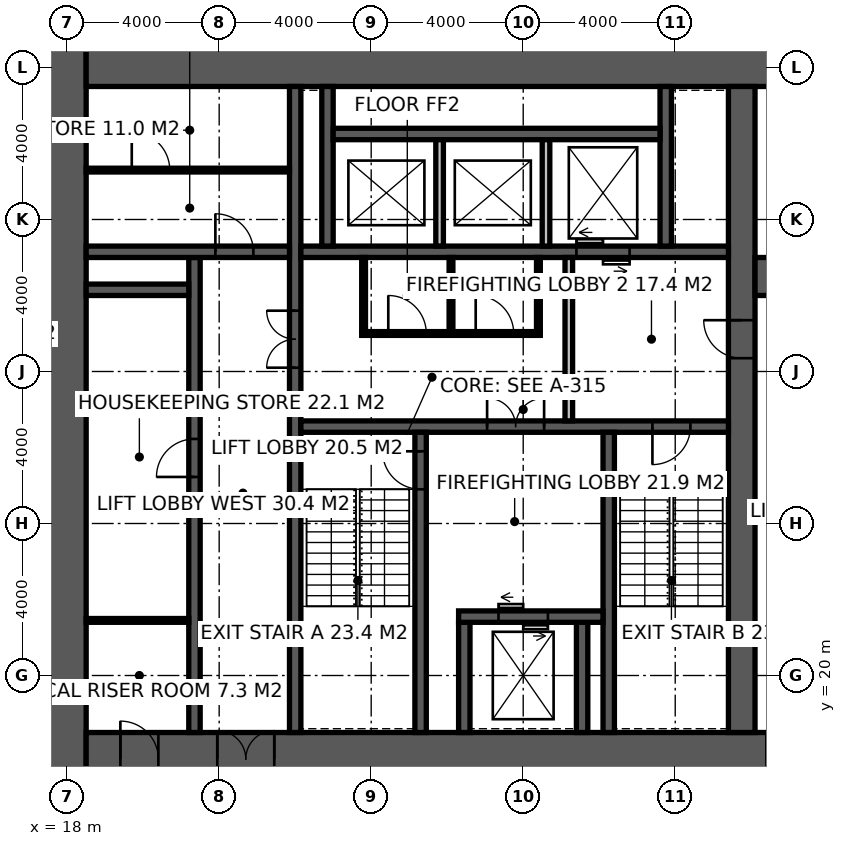
"""IFC4 building model, lengths in metres.
Left out: names, types, materials, properties, quantities, classifications, styles, units other than length and angle.
Written with IfcOpenShell. Run it as: python <this file> out.ifc"""

import sys

from ifc_helpers import new_model, si_unit, direction, frame, frame_2d, origin, place, context, subcontext, project, spatial, rectangle, extrude, element, fill, save


model = new_model("IFC4")
c1 = context("Model", 3, precision=1e-05, world=origin(), true_north=direction((0.0, 1.0)))
c2 = subcontext(c1, "Body", "Model", "MODEL_VIEW")
j1 = project(units=[si_unit("LENGTHUNIT", "METRE"), si_unit("PLANEANGLEUNIT", "RADIAN")], contexts=[c1])
p1 = place(None, origin())
s1 = spatial("IfcSite", under=j1, at=p1, CompositionType="ELEMENT")
p2 = place(p1, origin())
s2 = spatial("IfcBuilding", under=s1, at=p2, CompositionType="ELEMENT")
p3 = place(p2, frame((0.0, 0.0, 47.0)))
s3 = spatial("IfcBuildingStorey", under=s2, at=p3, CompositionType="ELEMENT", Elevation=47.0)
p4 = place(p3, frame((18.0, 17.1, -0.15), z_axis=(0.0, 0.0, 1.0), x_axis=(0.0, 1.0, 0.0)))
e1 = element("IfcWall", 1, at=p4, inside=s3, PredefinedType="SHEAR", context=c2, shape_type="SweptSolid", body=[
    extrude(rectangle(XDim=19.8, YDim=1.0, at=frame_2d((9.9, 0.0))), origin(), (0.0, 0.0, 1.0), 4.0),
])
p5 = place(p3, frame((18.5, 17.8, -0.15), z_axis=(0.0, 0.0, 1.0), x_axis=(1.0, 0.0, 0.0)))
e2 = element("IfcWall", 2, at=p5, inside=s3, PredefinedType="SHEAR", context=c2, shape_type="SweptSolid", body=[
    extrude(rectangle(XDim=23.4, YDim=1.4, at=frame_2d((11.7, 0.0))), origin(), (0.0, 0.0, 1.0), 4.0),
])
p6 = place(p5, frame((3.45, 0.0, 0.15)))
e3 = element("IfcOpeningElement", 3, at=p6, cuts=e2, PredefinedType="OPENING", context=c2, shape_type="SweptSolid", body=[
    extrude(rectangle(XDim=1.5, YDim=2.4, at=frame_2d((0.75, 1.2))), frame((0.0, 0.71, 0.0), z_axis=(0.0, -1.0, 0.0), x_axis=(1.0, 0.0, 0.0)), (0.0, 0.0, 1.0), 1.42),
])
p7 = place(p5, frame((17.9, 0.0, 0.15)))
e4 = element("IfcOpeningElement", 4, at=p7, cuts=e2, PredefinedType="OPENING", context=c2, shape_type="SweptSolid", body=[
    extrude(rectangle(XDim=1.5, YDim=2.4, at=frame_2d((0.75, 1.2))), frame((0.0, 0.71, 0.0), z_axis=(0.0, -1.0, 0.0), x_axis=(1.0, 0.0, 0.0)), (0.0, 0.0, 1.0), 1.42),
])
p8 = place(p5, frame((0.9, 0.0, 0.15)))
e5 = element("IfcOpeningElement", 5, at=p8, cuts=e2, PredefinedType="OPENING", context=c2, shape_type="SweptSolid", body=[
    extrude(rectangle(XDim=1.0, YDim=2.2, at=frame_2d((0.5, 1.1))), frame((0.0, 0.71, 0.0), z_axis=(0.0, -1.0, 0.0), x_axis=(1.0, 0.0, 0.0)), (0.0, 0.0, 1.0), 1.42),
])
p9 = place(p3, frame((18.5, 36.2, -0.15), z_axis=(0.0, 0.0, 1.0), x_axis=(1.0, 0.0, 0.0)))
e6 = element("IfcWall", 6, at=p9, inside=s3, PredefinedType="SHEAR", context=c2, shape_type="SweptSolid", body=[
    extrude(rectangle(XDim=23.4, YDim=1.4, at=frame_2d((11.7, 0.0))), origin(), (0.0, 0.0, 1.0), 4.0),
])
p10 = place(p3, frame((35.75, 18.5, -0.15), z_axis=(0.0, 0.0, 1.0), x_axis=(0.0, 1.0, 0.0)))
e7 = element("IfcWall", 7, at=p10, inside=s3, PredefinedType="SHEAR", context=c2, shape_type="SweptSolid", body=[
    extrude(rectangle(XDim=17.0, YDim=0.7, at=frame_2d((8.5, 0.0))), origin(), (0.0, 0.0, 1.0), 4.0),
])
p11 = place(p10, frame((9.85, 0.0, 0.15)))
e8 = element("IfcOpeningElement", 8, at=p11, cuts=e7, PredefinedType="OPENING", context=c2, shape_type="SweptSolid", body=[
    extrude(rectangle(XDim=1.0, YDim=2.2, at=frame_2d((0.5, 1.1))), frame((0.0, 0.36, 0.0), z_axis=(0.0, -1.0, 0.0), x_axis=(1.0, 0.0, 0.0)), (0.0, 0.0, 1.0), 0.72),
])
p12 = place(p3, frame((24.0, 18.5, -0.15), z_axis=(0.0, 0.0, 1.0), x_axis=(0.0, 1.0, 0.0)))
e9 = element("IfcWall", 9, at=p12, inside=s3, PredefinedType="SHEAR", context=c2, shape_type="SweptSolid", body=[
    extrude(rectangle(XDim=17.0, YDim=0.3, at=frame_2d((8.5, 0.0))), origin(), (0.0, 0.0, 1.0), 4.0),
])
p13 = place(p12, frame((9.6, 0.0, 0.15)))
e10 = element("IfcOpeningElement", 10, at=p13, cuts=e9, PredefinedType="OPENING", context=c2, shape_type="SweptSolid", body=[
    extrude(rectangle(XDim=1.5, YDim=2.4, at=frame_2d((0.75, 1.2))), frame((0.0, 0.16, 0.0), z_axis=(0.0, -1.0, 0.0), x_axis=(1.0, 0.0, 0.0)), (0.0, 0.0, 1.0), 0.32),
])
p14 = place(p3, frame((24.15, 26.55, -0.15), z_axis=(0.0, 0.0, 1.0), x_axis=(1.0, 0.0, 0.0)))
e11 = element("IfcWall", 11, at=p14, inside=s3, PredefinedType="SHEAR", context=c2, shape_type="SweptSolid", body=[
    extrude(rectangle(XDim=11.25, YDim=0.3, at=frame_2d((5.625, 0.0))), origin(), (0.0, 0.0, 1.0), 4.0),
])
p15 = place(p14, frame((9.25, 0.0, 0.15)))
e12 = element("IfcOpeningElement", 12, at=p15, cuts=e11, PredefinedType="OPENING", context=c2, shape_type="SweptSolid", body=[
    extrude(rectangle(XDim=1.0, YDim=2.2, at=frame_2d((0.5, 1.1))), frame((0.0, 0.16, 0.0), z_axis=(0.0, -1.0, 0.0), x_axis=(1.0, 0.0, 0.0)), (0.0, 0.0, 1.0), 0.32),
])
p16 = place(p14, frame((4.9, 0.0, 0.15)))
e13 = element("IfcOpeningElement", 13, at=p16, cuts=e11, PredefinedType="OPENING", context=c2, shape_type="SweptSolid", body=[
    extrude(rectangle(XDim=1.5, YDim=2.4, at=frame_2d((0.75, 1.2))), frame((0.0, 0.16, 0.0), z_axis=(0.0, -1.0, 0.0), x_axis=(1.0, 0.0, 0.0)), (0.0, 0.0, 1.0), 0.32),
])
p17 = place(p3, frame((27.3, 18.5, -0.15), z_axis=(0.0, 0.0, 1.0), x_axis=(0.0, 1.0, 0.0)))
e14 = element("IfcWall", 14, at=p17, inside=s3, PredefinedType="SHEAR", context=c2, shape_type="SweptSolid", body=[
    extrude(rectangle(XDim=7.9, YDim=0.3, at=frame_2d((3.95, 0.0))), origin(), (0.0, 0.0, 1.0), 4.0),
])
p18 = place(p17, frame((6.4, 0.0, 0.15)))
e15 = element("IfcOpeningElement", 15, at=p18, cuts=e14, PredefinedType="OPENING", context=c2, shape_type="SweptSolid", body=[
    extrude(rectangle(XDim=1.0, YDim=2.2, at=frame_2d((0.5, 1.1))), frame((0.0, 0.16, 0.0), z_axis=(0.0, -1.0, 0.0), x_axis=(1.0, 0.0, 0.0)), (0.0, 0.0, 1.0), 0.32),
])
p19 = place(p3, frame((32.25, 18.5, -0.15), z_axis=(0.0, 0.0, 1.0), x_axis=(0.0, 1.0, 0.0)))
e16 = element("IfcWall", 16, at=p19, inside=s3, PredefinedType="SHEAR", context=c2, shape_type="SweptSolid", body=[
    extrude(rectangle(XDim=7.9, YDim=0.3, at=frame_2d((3.95, 0.0))), origin(), (0.0, 0.0, 1.0), 4.0),
])
for number, where, z_axis, x_axis in (
    (17, (28.45, 18.5, -0.15), (0.0, 0.0, 1.0), (0.0, 1.0, 0.0)),
    (18, (31.55, 18.5, -0.15), (0.0, 0.0, 1.0), (0.0, 1.0, 0.0)),
):
    element("IfcWall", number, at=place(p3, frame(where, z_axis=z_axis, x_axis=x_axis)), inside=s3, PredefinedType="SHEAR", context=c2, shape_type="SweptSolid", body=[
        extrude(rectangle(XDim=2.9, YDim=0.3, at=frame_2d((1.45, 0.0))), origin(), (0.0, 0.0, 1.0), 4.0),
    ])
p20 = place(p3, frame((28.3, 21.55, -0.15), z_axis=(0.0, 0.0, 1.0), x_axis=(1.0, 0.0, 0.0)))
e19 = element("IfcWall", 19, at=p20, inside=s3, PredefinedType="SHEAR", context=c2, shape_type="SweptSolid", body=[
    extrude(rectangle(XDim=3.8, YDim=0.3, at=frame_2d((1.9, 0.0))), origin(), (0.0, 0.0, 1.0), 4.0),
])
p21 = place(p20, frame((1.05, 0.0, 0.15)))
e20 = element("IfcOpeningElement", 20, at=p21, cuts=e19, PredefinedType="OPENING", context=c2, shape_type="SweptSolid", body=[
    extrude(rectangle(XDim=1.3, YDim=2.4, at=frame_2d((0.65, 1.2))), frame((0.0, 0.16, 0.0), z_axis=(0.0, -1.0, 0.0), x_axis=(1.0, 0.0, 0.0)), (0.0, 0.0, 1.0), 0.32),
])
p22 = place(p3, frame((24.15, 31.15, -0.15), z_axis=(0.0, 0.0, 1.0), x_axis=(1.0, 0.0, 0.0)))
e21 = element("IfcWall", 21, at=p22, inside=s3, PredefinedType="SHEAR", context=c2, shape_type="SweptSolid", body=[
    extrude(rectangle(XDim=11.25, YDim=0.3, at=frame_2d((5.625, 0.0))), origin(), (0.0, 0.0, 1.0), 4.0),
])
p23 = place(p22, frame((7.25, 0.0, 0.15)))
e22 = element("IfcOpeningElement", 22, at=p23, cuts=e21, PredefinedType="OPENING", context=c2, shape_type="SweptSolid", body=[
    extrude(rectangle(XDim=1.4, YDim=2.4, at=frame_2d((0.7, 1.2))), frame((0.0, 0.16, 0.0), z_axis=(0.0, -1.0, 0.0), x_axis=(1.0, 0.0, 0.0)), (0.0, 0.0, 1.0), 0.32),
])
p24 = place(p3, frame((21.35, 18.5, -0.15), z_axis=(0.0, 0.0, 1.0), x_axis=(0.0, 1.0, 0.0)))
e23 = element("IfcWall", 23, at=p24, inside=s3, PredefinedType="SHEAR", context=c2, shape_type="SweptSolid", body=[
    extrude(rectangle(XDim=12.5, YDim=0.3, at=frame_2d((6.25, 0.0))), origin(), (0.0, 0.0, 1.0), 4.0),
])
p25 = place(p24, frame((6.725, 0.0, 0.15)))
e24 = element("IfcOpeningElement", 24, at=p25, cuts=e23, PredefinedType="OPENING", context=c2, shape_type="SweptSolid", body=[
    extrude(rectangle(XDim=1.0, YDim=2.2, at=frame_2d((0.5, 1.1))), frame((0.0, 0.16, 0.0), z_axis=(0.0, -1.0, 0.0), x_axis=(1.0, 0.0, 0.0)), (0.0, 0.0, 1.0), 0.32),
])
p26 = place(p3, frame((18.5, 31.15, -0.15), z_axis=(0.0, 0.0, 1.0), x_axis=(1.0, 0.0, 0.0)))
e25 = element("IfcWall", 25, at=p26, inside=s3, PredefinedType="SHEAR", context=c2, shape_type="SweptSolid", body=[
    extrude(rectangle(XDim=5.35, YDim=0.3, at=frame_2d((2.675, 0.0))), origin(), (0.0, 0.0, 1.0), 4.0),
])
p27 = place(p26, frame((3.4, 0.0, 0.15)))
e26 = element("IfcOpeningElement", 26, at=p27, cuts=e25, PredefinedType="OPENING", context=c2, shape_type="SweptSolid", body=[
    extrude(rectangle(XDim=1.0, YDim=2.2, at=frame_2d((0.5, 1.1))), frame((0.0, 0.16, 0.0), z_axis=(0.0, -1.0, 0.0), x_axis=(1.0, 0.0, 0.0)), (0.0, 0.0, 1.0), 0.32),
])
p28 = place(p3, frame((18.5, 30.15, -0.15), z_axis=(0.0, 0.0, 1.0), x_axis=(1.0, 0.0, 0.0)))
e27 = element("IfcWall", 27, at=p28, inside=s3, PredefinedType="SHEAR", context=c2, shape_type="SweptSolid", body=[
    extrude(rectangle(XDim=2.7, YDim=0.3, at=frame_2d((1.35, 0.0))), origin(), (0.0, 0.0, 1.0), 4.0),
])
for number, where, z_axis, x_axis in (
    (28, (24.85, 31.3, -0.15), (0.0, 0.0, 1.0), (0.0, 1.0, 0.0)),
    (29, (33.75, 31.3, -0.15), (0.0, 0.0, 1.0), (0.0, 1.0, 0.0)),
):
    element("IfcWall", number, at=place(p3, frame(where, z_axis=z_axis, x_axis=x_axis)), inside=s3, PredefinedType="SHEAR", context=c2, shape_type="SweptSolid", body=[
        extrude(rectangle(XDim=4.2, YDim=0.3, at=frame_2d((2.1, 0.0))), origin(), (0.0, 0.0, 1.0), 4.0),
    ])
p29 = place(p3, frame((25.0, 34.25, -0.15), z_axis=(0.0, 0.0, 1.0), x_axis=(1.0, 0.0, 0.0)))
e30 = element("IfcWall", 30, at=p29, inside=s3, PredefinedType="SHEAR", context=c2, shape_type="SweptSolid", body=[
    extrude(rectangle(XDim=8.6, YDim=0.3, at=frame_2d((4.3, 0.0))), origin(), (0.0, 0.0, 1.0), 4.0),
])
for number, where, z_axis, x_axis in (
    (31, (27.8, 31.3, -0.15), (0.0, 0.0, 1.0), (0.0, 1.0, 0.0)),
    (32, (30.6, 31.3, -0.15), (0.0, 0.0, 1.0), (0.0, 1.0, 0.0)),
):
    element("IfcWall", number, at=place(p3, frame(where, z_axis=z_axis, x_axis=x_axis)), inside=s3, PredefinedType="SOLIDWALL", context=c2, shape_type="SweptSolid", body=[
        extrude(rectangle(XDim=2.8, YDim=0.2, at=frame_2d((1.4, 0.0))), origin(), (0.0, 0.0, 1.0), 4.0),
    ])
p30 = place(p3, frame((36.1, 30.5, -0.15), z_axis=(0.0, 0.0, 1.0), x_axis=(1.0, 0.0, 0.0)))
e33 = element("IfcWall", 33, at=p30, inside=s3, PredefinedType="SHEAR", context=c2, shape_type="SweptSolid", body=[
    extrude(rectangle(XDim=5.8, YDim=1.0, at=frame_2d((2.9, 0.0))), origin(), (0.0, 0.0, 1.0), 4.0),
])
p31 = place(p30, frame((0.6, 0.0, 0.15)))
e34 = element("IfcOpeningElement", 34, at=p31, cuts=e33, PredefinedType="OPENING", context=c2, shape_type="SweptSolid", body=[
    extrude(rectangle(XDim=1.0, YDim=2.2, at=frame_2d((0.5, 1.1))), frame((0.0, 0.51, 0.0), z_axis=(0.0, -1.0, 0.0), x_axis=(1.0, 0.0, 0.0)), (0.0, 0.0, 1.0), 1.02),
])
p32 = place(p3, frame((31.2, 26.7, 0.0), z_axis=(0.0, 0.0, 1.0), x_axis=(0.0, 1.0, 0.0)))
e35 = element("IfcWall", 35, at=p32, inside=s3, PredefinedType="SOLIDWALL", context=c2, shape_type="SweptSolid", body=[
    extrude(rectangle(XDim=4.3, YDim=0.2, at=frame_2d((2.15, 0.0))), origin(), (0.0, 0.0, 1.0), 3.85),
])
p33 = place(p3, frame((18.5, 33.3, 0.0), z_axis=(0.0, 0.0, 1.0), x_axis=(1.0, 0.0, 0.0)))
e36 = element("IfcWall", 36, at=p33, inside=s3, PredefinedType="PARTITIONING", context=c2, shape_type="SweptSolid", body=[
    extrude(rectangle(XDim=5.35, YDim=0.1, at=frame_2d((2.675, 0.0))), origin(), (0.0, 0.0, 1.0), 3.85),
])
p34 = place(p33, frame((1.2, 0.0, 0.0)))
e37 = element("IfcOpeningElement", 37, at=p34, cuts=e36, PredefinedType="OPENING", context=c2, shape_type="SweptSolid", body=[
    extrude(rectangle(XDim=1.0, YDim=2.2, at=frame_2d((0.5, 1.1))), frame((0.0, 0.06, 0.0), z_axis=(0.0, -1.0, 0.0), x_axis=(1.0, 0.0, 0.0)), (0.0, 0.0, 1.0), 0.12),
])
p35 = place(p3, frame((25.75, 29.0, 0.0), z_axis=(0.0, 0.0, 1.0), x_axis=(1.0, 0.0, 0.0)))
e38 = element("IfcWall", 38, at=p35, inside=s3, PredefinedType="PARTITIONING", context=c2, shape_type="SweptSolid", body=[
    extrude(rectangle(XDim=4.7, YDim=0.1, at=frame_2d((2.35, 0.0))), origin(), (0.0, 0.0, 1.0), 3.85),
])
p36 = place(p35, frame((0.7, 0.0, 0.0)))
e39 = element("IfcOpeningElement", 39, at=p36, cuts=e38, PredefinedType="OPENING", context=c2, shape_type="SweptSolid", body=[
    extrude(rectangle(XDim=1.0, YDim=2.2, at=frame_2d((0.5, 1.1))), frame((0.0, 0.06, 0.0), z_axis=(0.0, -1.0, 0.0), x_axis=(1.0, 0.0, 0.0)), (0.0, 0.0, 1.0), 0.12),
])
p37 = place(p35, frame((3.0, 0.0, 0.0)))
e40 = element("IfcOpeningElement", 40, at=p37, cuts=e38, PredefinedType="OPENING", context=c2, shape_type="SweptSolid", body=[
    extrude(rectangle(XDim=1.0, YDim=2.2, at=frame_2d((0.5, 1.1))), frame((0.0, 0.06, 0.0), z_axis=(0.0, -1.0, 0.0), x_axis=(1.0, 0.0, 0.0)), (0.0, 0.0, 1.0), 0.12),
])
for number, where, z_axis, x_axis in (
    (41, (25.8, 29.05, 0.0), (0.0, 0.0, 1.0), (0.0, 1.0, 0.0)),
    (42, (30.4, 29.05, 0.0), (0.0, 0.0, 1.0), (0.0, 1.0, 0.0)),
    (43, (28.1, 29.05, 0.0), (0.0, 0.0, 1.0), (0.0, 1.0, 0.0)),
):
    element("IfcWall", number, at=place(p3, frame(where, z_axis=z_axis, x_axis=x_axis)), inside=s3, PredefinedType="PARTITIONING", context=c2, shape_type="SweptSolid", body=[
        extrude(rectangle(XDim=1.95, YDim=0.1, at=frame_2d((0.975, 0.0))), origin(), (0.0, 0.0, 1.0), 3.85),
    ])
p38 = place(p3, frame((18.5, 21.45, 0.0), z_axis=(0.0, 0.0, 1.0), x_axis=(1.0, 0.0, 0.0)))
e44 = element("IfcWall", 44, at=p38, inside=s3, PredefinedType="PARTITIONING", context=c2, shape_type="SweptSolid", body=[
    extrude(rectangle(XDim=2.7, YDim=0.1, at=frame_2d((1.35, 0.0))), origin(), (0.0, 0.0, 1.0), 3.85),
])
p39 = place(p18, origin())
e45 = element("IfcDoor", 45, at=p39, inside=s3, OperationType="SINGLE_SWING_RIGHT", PredefinedType="DOOR", context=c2, shape_type="SweptSolid", body=[
    extrude(rectangle(XDim=1.0, YDim=2.2, at=frame_2d((0.5, 1.1))), frame((0.0, 0.025, 0.0), z_axis=(0.0, -1.0, 0.0), x_axis=(1.0, 0.0, 0.0)), (0.0, 0.0, 1.0), 0.05),
])
fill(e15, e45)
p40 = place(p15, frame((1.0, 0.0, 0.0), z_axis=(0.0, 0.0, 1.0), x_axis=(-1.0, 0.0, 0.0)))
e46 = element("IfcDoor", 46, at=p40, inside=s3, OperationType="SINGLE_SWING_RIGHT", PredefinedType="DOOR", context=c2, shape_type="SweptSolid", body=[
    extrude(rectangle(XDim=1.0, YDim=2.2, at=frame_2d((0.5, 1.1))), frame((0.0, 0.025, 0.0), z_axis=(0.0, -1.0, 0.0), x_axis=(1.0, 0.0, 0.0)), (0.0, 0.0, 1.0), 0.05),
])
fill(e12, e46)
p41 = place(p11, origin())
e47 = element("IfcDoor", 47, at=p41, inside=s3, OperationType="SINGLE_SWING_RIGHT", PredefinedType="DOOR", context=c2, shape_type="SweptSolid", body=[
    extrude(rectangle(XDim=1.0, YDim=2.2, at=frame_2d((0.5, 1.1))), frame((0.0, 0.025, 0.0), z_axis=(0.0, -1.0, 0.0), x_axis=(1.0, 0.0, 0.0)), (0.0, 0.0, 1.0), 0.05),
])
fill(e8, e47)
p42 = place(p16, origin())
e48 = element("IfcDoor", 48, at=p42, inside=s3, OperationType="DOUBLE_DOOR_DOUBLE_SWING", PredefinedType="DOOR", context=c2, shape_type="SweptSolid", body=[
    extrude(rectangle(XDim=1.5, YDim=2.4, at=frame_2d((0.75, 1.2))), frame((0.0, 0.025, 0.0), z_axis=(0.0, -1.0, 0.0), x_axis=(1.0, 0.0, 0.0)), (0.0, 0.0, 1.0), 0.05),
])
fill(e13, e48)
p43 = place(p13, origin())
e49 = element("IfcDoor", 49, at=p43, inside=s3, OperationType="DOUBLE_DOOR_DOUBLE_SWING", PredefinedType="DOOR", context=c2, shape_type="SweptSolid", body=[
    extrude(rectangle(XDim=1.5, YDim=2.4, at=frame_2d((0.75, 1.2))), frame((0.0, 0.025, 0.0), z_axis=(0.0, -1.0, 0.0), x_axis=(1.0, 0.0, 0.0)), (0.0, 0.0, 1.0), 0.05),
])
fill(e10, e49)
p44 = place(p27, origin())
e50 = element("IfcDoor", 50, at=p44, inside=s3, OperationType="SINGLE_SWING_LEFT", PredefinedType="DOOR", context=c2, shape_type="SweptSolid", body=[
    extrude(rectangle(XDim=1.0, YDim=2.2, at=frame_2d((0.5, 1.1))), frame((0.0, 0.025, 0.0), z_axis=(0.0, -1.0, 0.0), x_axis=(1.0, 0.0, 0.0)), (0.0, 0.0, 1.0), 0.05),
])
fill(e26, e50)
p45 = place(p34, origin())
e51 = element("IfcDoor", 51, at=p45, inside=s3, OperationType="SINGLE_SWING_LEFT", PredefinedType="DOOR", context=c2, shape_type="SweptSolid", body=[
    extrude(rectangle(XDim=1.0, YDim=2.2, at=frame_2d((0.5, 1.1))), frame((0.0, 0.025, 0.0), z_axis=(0.0, -1.0, 0.0), x_axis=(1.0, 0.0, 0.0)), (0.0, 0.0, 1.0), 0.05),
])
fill(e37, e51)
p46 = place(p36, origin())
e52 = element("IfcDoor", 52, at=p46, inside=s3, OperationType="SINGLE_SWING_LEFT", PredefinedType="DOOR", context=c2, shape_type="SweptSolid", body=[
    extrude(rectangle(XDim=1.0, YDim=2.2, at=frame_2d((0.5, 1.1))), frame((0.0, 0.025, 0.0), z_axis=(0.0, -1.0, 0.0), x_axis=(1.0, 0.0, 0.0)), (0.0, 0.0, 1.0), 0.05),
])
fill(e39, e52)
p47 = place(p37, origin())
e53 = element("IfcDoor", 53, at=p47, inside=s3, OperationType="SINGLE_SWING_LEFT", PredefinedType="DOOR", context=c2, shape_type="SweptSolid", body=[
    extrude(rectangle(XDim=1.0, YDim=2.2, at=frame_2d((0.5, 1.1))), frame((0.0, 0.025, 0.0), z_axis=(0.0, -1.0, 0.0), x_axis=(1.0, 0.0, 0.0)), (0.0, 0.0, 1.0), 0.05),
])
fill(e40, e53)
p48 = place(p25, origin())
e54 = element("IfcDoor", 54, at=p48, inside=s3, OperationType="SINGLE_SWING_LEFT", PredefinedType="DOOR", context=c2, shape_type="SweptSolid", body=[
    extrude(rectangle(XDim=1.0, YDim=2.2, at=frame_2d((0.5, 1.1))), frame((0.0, 0.025, 0.0), z_axis=(0.0, -1.0, 0.0), x_axis=(1.0, 0.0, 0.0)), (0.0, 0.0, 1.0), 0.05),
])
fill(e24, e54)
p49 = place(p6, origin())
e55 = element("IfcDoor", 55, at=p49, inside=s3, OperationType="DOUBLE_DOOR_DOUBLE_SWING", PredefinedType="DOOR", context=c2, shape_type="SweptSolid", body=[
    extrude(rectangle(XDim=1.5, YDim=2.4, at=frame_2d((0.75, 1.2))), frame((0.0, 0.025, 0.0), z_axis=(0.0, -1.0, 0.0), x_axis=(1.0, 0.0, 0.0)), (0.0, 0.0, 1.0), 0.05),
])
fill(e3, e55)
p50 = place(p8, origin())
e56 = element("IfcDoor", 56, at=p50, inside=s3, OperationType="SINGLE_SWING_LEFT", PredefinedType="DOOR", context=c2, shape_type="SweptSolid", body=[
    extrude(rectangle(XDim=1.0, YDim=2.2, at=frame_2d((0.5, 1.1))), frame((0.0, 0.025, 0.0), z_axis=(0.0, -1.0, 0.0), x_axis=(1.0, 0.0, 0.0)), (0.0, 0.0, 1.0), 0.05),
])
fill(e5, e56)
p51 = place(p21, origin())
e57 = element("IfcDoor", 57, at=p51, inside=s3, OperationType="DOUBLE_DOOR_SLIDING", PredefinedType="DOOR", context=c2, shape_type="SweptSolid", body=[
    extrude(rectangle(XDim=1.3, YDim=2.4, at=frame_2d((0.65, 1.2))), frame((0.0, 0.025, 0.0), z_axis=(0.0, -1.0, 0.0), x_axis=(1.0, 0.0, 0.0)), (0.0, 0.0, 1.0), 0.05),
])
fill(e20, e57)
p52 = place(p23, origin())
e58 = element("IfcDoor", 58, at=p52, inside=s3, OperationType="DOUBLE_DOOR_SLIDING", PredefinedType="DOOR", context=c2, shape_type="SweptSolid", body=[
    extrude(rectangle(XDim=1.4, YDim=2.4, at=frame_2d((0.7, 1.2))), frame((0.0, 0.025, 0.0), z_axis=(0.0, -1.0, 0.0), x_axis=(1.0, 0.0, 0.0)), (0.0, 0.0, 1.0), 0.05),
])
fill(e22, e58)
save(model, sys.argv[1])
